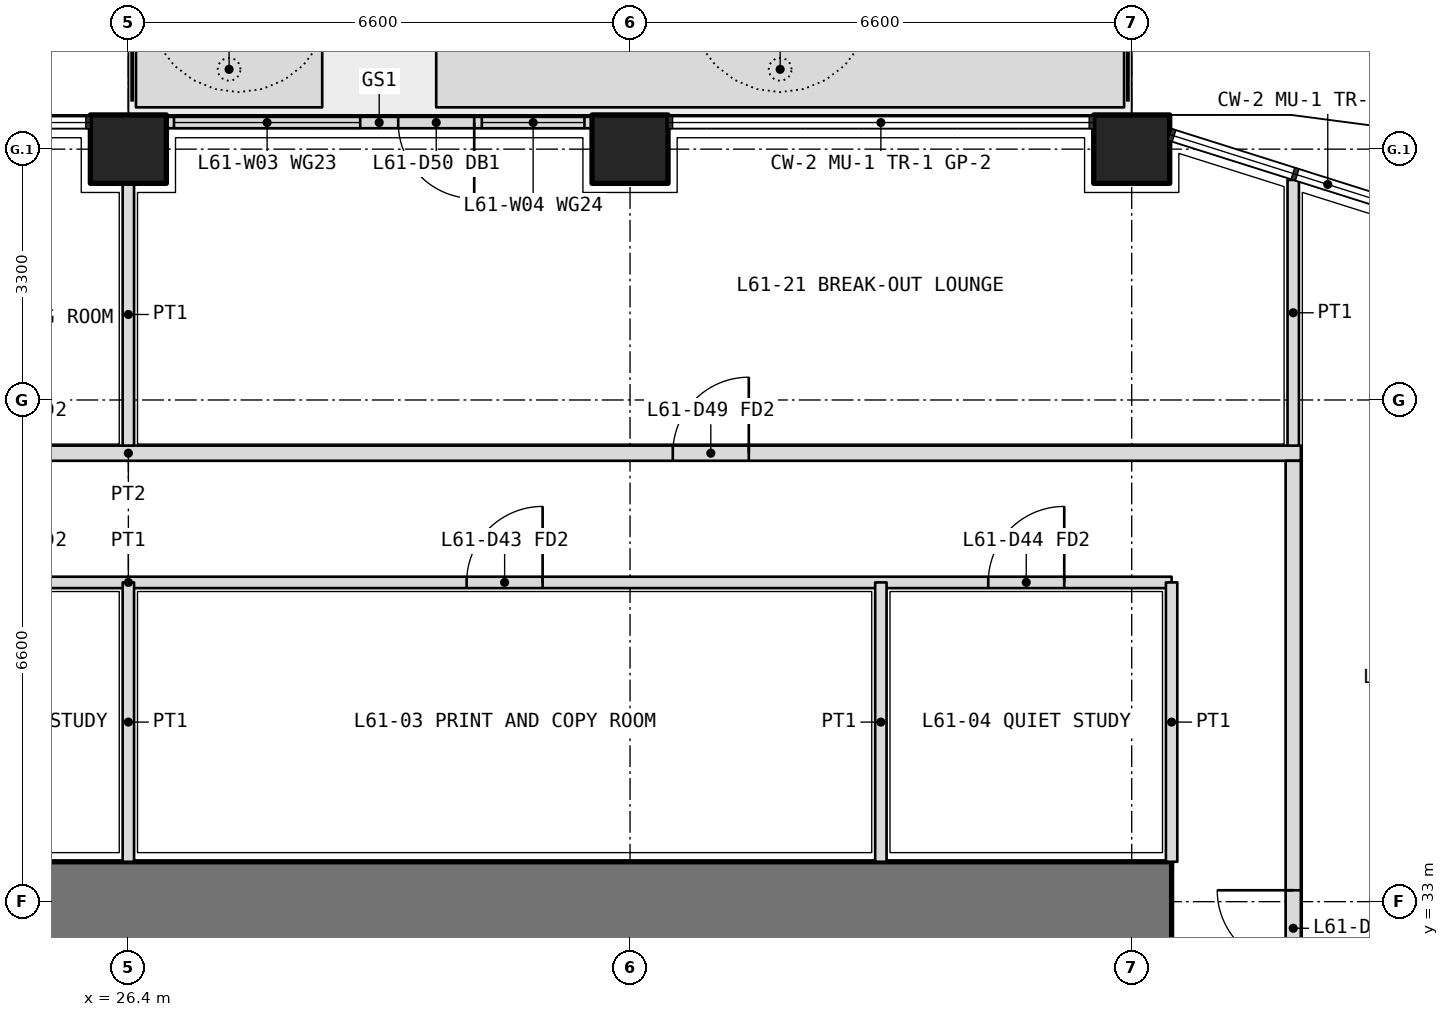
"""IFC4 building model, lengths in metres.
Left out: names, types, materials, properties, quantities, classifications, styles, units other than length and angle.
Written with IfcOpenShell. Run it as: python <this file> out.ifc"""

import sys

from ifc_helpers import new_model, si_unit, direction, frame, frame_2d, origin, origin_2d, place, context, subcontext, project, spatial, polyline, rectangle, outline, extrude, element, fill, save


model = new_model("IFC4")
c1 = context("Model", 3, precision=1e-05, world=origin(), true_north=direction((0.0, 1.0)))
c2 = subcontext(c1, "Body", "Model", "MODEL_VIEW")
j1 = project(units=[si_unit("LENGTHUNIT", "METRE"), si_unit("PLANEANGLEUNIT", "RADIAN")], contexts=[c1])
p1 = place(None, origin())
s1 = spatial("IfcSite", under=j1, at=p1, CompositionType="ELEMENT")
p2 = place(p1, origin())
s2 = spatial("IfcBuilding", under=s1, at=p2, CompositionType="ELEMENT")
p3 = place(p2, frame((0.0, 0.0, 267.0)))
s3 = spatial("IfcBuildingStorey", under=s2, at=p3, CompositionType="ELEMENT", Elevation=267.0)
for number, where, z_axis, x_axis in (
    (1, (26.4, 42.9, 0.0), (0.0, 0.0, 1.0), (1.0, 0.0, 0.0)),
    (2, (33.0, 42.9, 0.0), (0.0, 0.0, 1.0), (1.0, 0.0, 0.0)),
    (3, (39.6, 42.9, 0.0), (0.0, 0.0, 1.0), (1.0, 0.0, 0.0)),
):
    element("IfcColumn", number, at=place(p3, frame(where, z_axis=z_axis, x_axis=x_axis)), inside=s3, PredefinedType="COLUMN", context=c2, shape_type="SweptSolid", body=[
        extrude(rectangle(XDim=1.0, YDim=0.9, at=origin_2d()), origin(), (0.0, 0.0, 1.0), 4.2),
    ])
p4 = place(p3, origin())
e4 = element("IfcWall", 4, at=p4, inside=s3, PredefinedType="USERDEFINED", context=c2, shape_type="SweptSolid", body=[
    extrude(outline(polyline([(26.5, 43.45), (28.95, 43.45), (28.95, 44.45), (26.5, 44.45), (26.5, 43.45)]), holes=[polyline([(26.65, 43.6), (28.8, 43.6), (28.8, 44.3), (26.65, 44.3), (26.65, 43.6)])]), origin(), (0.0, 0.0, 1.0), 1.05),
])
p5 = place(p3, origin())
e5 = element("IfcWall", 5, at=p5, inside=s3, PredefinedType="USERDEFINED", context=c2, shape_type="SweptSolid", body=[
    extrude(outline(polyline([(30.45, 43.45), (39.5, 43.45), (39.5, 44.45), (30.45, 44.45), (30.45, 43.45)]), holes=[polyline([(30.6, 43.6), (39.35, 43.6), (39.35, 44.3), (30.6, 44.3), (30.6, 43.6)])]), origin(), (0.0, 0.0, 1.0), 1.05),
])
p6 = place(p3, frame((32.5, 43.25, 0.0), z_axis=(0.0, 0.0, 1.0), x_axis=(-1.0, 0.0, 0.0)))
e6 = element("IfcWall", 6, at=p6, inside=s3, PredefinedType="SOLIDWALL", context=c2, shape_type="SweptSolid", body=[
    extrude(rectangle(XDim=5.6, YDim=0.15, at=frame_2d((2.8, 0.0))), origin(), (0.0, 0.0, 1.0), 2.7),
])
p7 = place(p6, frame((1.55, 0.0, 0.0)))
e7 = element("IfcOpeningElement", 7, at=p7, cuts=e6, PredefinedType="OPENING", context=c2, shape_type="SweptSolid", body=[
    extrude(rectangle(XDim=1.0, YDim=2.4, at=frame_2d((0.5, 1.2))), frame((0.0, 0.085, 0.0), z_axis=(0.0, -1.0, 0.0), x_axis=(1.0, 0.0, 0.0)), (0.0, 0.0, 1.0), 0.17),
])
p8 = place(p6, frame((0.1, 0.0, 0.1)))
e8 = element("IfcOpeningElement", 8, at=p8, cuts=e6, PredefinedType="OPENING", context=c2, shape_type="SweptSolid", body=[
    extrude(rectangle(XDim=1.35, YDim=2.3, at=frame_2d((0.675, 1.15))), frame((0.0, 0.085, 0.0), z_axis=(0.0, -1.0, 0.0), x_axis=(1.0, 0.0, 0.0)), (0.0, 0.0, 1.0), 0.17),
])
p9 = place(p6, frame((3.05, 0.0, 0.1)))
e9 = element("IfcOpeningElement", 9, at=p9, cuts=e6, PredefinedType="OPENING", context=c2, shape_type="SweptSolid", body=[
    extrude(rectangle(XDim=2.45, YDim=2.3, at=frame_2d((1.225, 1.15))), frame((0.0, 0.085, 0.0), z_axis=(0.0, -1.0, 0.0), x_axis=(1.0, 0.0, 0.0)), (0.0, 0.0, 1.0), 0.17),
])
p10 = place(p3, frame((40.125, 33.0, 0.0), z_axis=(0.0, 0.0, 1.0), x_axis=(-1.0, 0.0, 0.0)))
e10 = element("IfcWall", 10, at=p10, inside=s3, PredefinedType="SHEAR", context=c2, shape_type="SweptSolid", body=[
    extrude(rectangle(XDim=27.45, YDim=1.05, at=frame_2d((13.725, 0.0))), origin(), (0.0, 0.0, 1.0), 4.2),
])
p11 = place(p3, frame((12.675, 37.2, 0.0), z_axis=(0.0, 0.0, 1.0), x_axis=(1.0, 0.0, 0.0)))
e11 = element("IfcWall", 11, at=p11, inside=s3, PredefinedType="PARTITIONING", context=c2, shape_type="SweptSolid", body=[
    extrude(rectangle(XDim=27.45, YDim=0.15, at=frame_2d((13.725, 0.0))), origin(), (0.0, 0.0, 1.0), 3.0),
])
p12 = place(p11, frame((4.712, 0.0, 0.0)))
e12 = element("IfcOpeningElement", 12, at=p12, cuts=e11, PredefinedType="OPENING", context=c2, shape_type="SweptSolid", body=[
    extrude(rectangle(XDim=1.0, YDim=2.1, at=frame_2d((0.5, 1.05))), frame((0.0, 0.085, 0.0), z_axis=(0.0, -1.0, 0.0), x_axis=(1.0, 0.0, 0.0)), (0.0, 0.0, 1.0), 0.17),
])
p13 = place(p11, frame((11.575, 0.0, 0.0)))
e13 = element("IfcOpeningElement", 13, at=p13, cuts=e11, PredefinedType="OPENING", context=c2, shape_type="SweptSolid", body=[
    extrude(rectangle(XDim=1.0, YDim=2.1, at=frame_2d((0.5, 1.05))), frame((0.0, 0.085, 0.0), z_axis=(0.0, -1.0, 0.0), x_axis=(1.0, 0.0, 0.0)), (0.0, 0.0, 1.0), 0.17),
])
p14 = place(p11, frame((18.175, 0.0, 0.0)))
e14 = element("IfcOpeningElement", 14, at=p14, cuts=e11, PredefinedType="OPENING", context=c2, shape_type="SweptSolid", body=[
    extrude(rectangle(XDim=1.0, YDim=2.1, at=frame_2d((0.5, 1.05))), frame((0.0, 0.085, 0.0), z_axis=(0.0, -1.0, 0.0), x_axis=(1.0, 0.0, 0.0)), (0.0, 0.0, 1.0), 0.17),
])
p15 = place(p11, frame((25.038, 0.0, 0.0)))
e15 = element("IfcOpeningElement", 15, at=p15, cuts=e11, PredefinedType="OPENING", context=c2, shape_type="SweptSolid", body=[
    extrude(rectangle(XDim=1.0, YDim=2.1, at=frame_2d((0.5, 1.05))), frame((0.0, 0.085, 0.0), z_axis=(0.0, -1.0, 0.0), x_axis=(1.0, 0.0, 0.0)), (0.0, 0.0, 1.0), 0.17),
])
for number, where, z_axis, x_axis in (
    (16, (40.125, 33.525, 0.0), (0.0, 0.0, 1.0), (0.0, 1.0, 0.0)),
    (17, (26.4, 33.525, 0.0), (0.0, 0.0, 1.0), (0.0, 1.0, 0.0)),
):
    element("IfcWall", number, at=place(p3, frame(where, z_axis=z_axis, x_axis=x_axis)), inside=s3, PredefinedType="PARTITIONING", context=c2, shape_type="SweptSolid", body=[
        extrude(rectangle(XDim=3.675, YDim=0.15, at=frame_2d((1.837, 0.0))), origin(), (0.0, 0.0, 1.0), 3.0),
    ])
p16 = place(p3, frame((36.3, 33.525, 0.0), z_axis=(0.0, 0.0, 1.0), x_axis=(0.0, 1.0, 0.0)))
e18 = element("IfcWall", 18, at=p16, inside=s3, PredefinedType="PARTITIONING", context=c2, shape_type="SweptSolid", body=[
    extrude(rectangle(XDim=3.675, YDim=0.15, at=frame_2d((1.837, 0.0))), origin(), (0.0, 0.0, 1.0), 3.9),
])
p17 = place(p3, frame((10.975, 38.9, 0.0), z_axis=(0.0, 0.0, 1.0), x_axis=(1.0, 0.0, 0.0)))
e19 = element("IfcWall", 19, at=p17, inside=s3, PredefinedType="PARTITIONING", context=c2, shape_type="SweptSolid", body=[
    extrude(rectangle(XDim=30.85, YDim=0.2, at=frame_2d((15.425, 0.0))), origin(), (0.0, 0.0, 1.0), 3.0),
])
p18 = place(p17, frame((0.663, 0.0, 0.0)))
e20 = element("IfcOpeningElement", 20, at=p18, cuts=e19, PredefinedType="OPENING", context=c2, shape_type="SweptSolid", body=[
    extrude(rectangle(XDim=1.0, YDim=2.1, at=frame_2d((0.5, 1.05))), frame((0.0, 0.11, 0.0), z_axis=(0.0, -1.0, 0.0), x_axis=(1.0, 0.0, 0.0)), (0.0, 0.0, 1.0), 0.22),
])
p19 = place(p17, frame((3.375, 0.0, 0.0)))
e21 = element("IfcOpeningElement", 21, at=p19, cuts=e19, PredefinedType="OPENING", context=c2, shape_type="SweptSolid", body=[
    extrude(rectangle(XDim=1.0, YDim=2.1, at=frame_2d((0.5, 1.05))), frame((0.0, 0.11, 0.0), z_axis=(0.0, -1.0, 0.0), x_axis=(1.0, 0.0, 0.0)), (0.0, 0.0, 1.0), 0.22),
])
p20 = place(p17, frame((8.325, 0.0, 0.0)))
e22 = element("IfcOpeningElement", 22, at=p20, cuts=e19, PredefinedType="OPENING", context=c2, shape_type="SweptSolid", body=[
    extrude(rectangle(XDim=1.0, YDim=2.1, at=frame_2d((0.5, 1.05))), frame((0.0, 0.11, 0.0), z_axis=(0.0, -1.0, 0.0), x_axis=(1.0, 0.0, 0.0)), (0.0, 0.0, 1.0), 0.22),
])
p21 = place(p17, frame((13.275, 0.0, 0.0)))
e23 = element("IfcOpeningElement", 23, at=p21, cuts=e19, PredefinedType="OPENING", context=c2, shape_type="SweptSolid", body=[
    extrude(rectangle(XDim=1.0, YDim=2.1, at=frame_2d((0.5, 1.05))), frame((0.0, 0.11, 0.0), z_axis=(0.0, -1.0, 0.0), x_axis=(1.0, 0.0, 0.0)), (0.0, 0.0, 1.0), 0.22),
])
p22 = place(p17, frame((22.587, 0.0, 0.0)))
e24 = element("IfcOpeningElement", 24, at=p22, cuts=e19, PredefinedType="OPENING", context=c2, shape_type="SweptSolid", body=[
    extrude(rectangle(XDim=1.0, YDim=2.1, at=frame_2d((0.5, 1.05))), frame((0.0, 0.11, 0.0), z_axis=(0.0, -1.0, 0.0), x_axis=(1.0, 0.0, 0.0)), (0.0, 0.0, 1.0), 0.22),
])
p23 = place(p3, frame((41.725, 19.8, 0.0), z_axis=(0.0, 0.0, 1.0), x_axis=(0.0, 1.0, 0.0)))
e25 = element("IfcWall", 25, at=p23, inside=s3, PredefinedType="PARTITIONING", context=c2, shape_type="SweptSolid", body=[
    extrude(rectangle(XDim=19.0, YDim=0.2, at=frame_2d((9.5, 0.0))), origin(), (0.0, 0.0, 1.0), 3.0),
])
p24 = place(p23, frame((1.0, 0.0, 0.0)))
e26 = element("IfcOpeningElement", 26, at=p24, cuts=e25, PredefinedType="OPENING", context=c2, shape_type="SweptSolid", body=[
    extrude(rectangle(XDim=1.0, YDim=2.1, at=frame_2d((0.5, 1.05))), frame((0.0, 0.11, 0.0), z_axis=(0.0, -1.0, 0.0), x_axis=(1.0, 0.0, 0.0)), (0.0, 0.0, 1.0), 0.22),
])
p25 = place(p23, frame((4.35, 0.0, 0.0)))
e27 = element("IfcOpeningElement", 27, at=p25, cuts=e25, PredefinedType="OPENING", context=c2, shape_type="SweptSolid", body=[
    extrude(rectangle(XDim=0.9, YDim=2.1, at=frame_2d((0.45, 1.05))), frame((0.0, 0.11, 0.0), z_axis=(0.0, -1.0, 0.0), x_axis=(1.0, 0.0, 0.0)), (0.0, 0.0, 1.0), 0.22),
])
p26 = place(p23, frame((12.35, 0.0, 0.0)))
e28 = element("IfcOpeningElement", 28, at=p26, cuts=e25, PredefinedType="OPENING", context=c2, shape_type="SweptSolid", body=[
    extrude(rectangle(XDim=1.0, YDim=2.1, at=frame_2d((0.5, 1.05))), frame((0.0, 0.11, 0.0), z_axis=(0.0, -1.0, 0.0), x_axis=(1.0, 0.0, 0.0)), (0.0, 0.0, 1.0), 0.22),
])
p27 = place(p3, frame((41.725, 42.495, 0.0), z_axis=(0.0, 0.0, 1.0), x_axis=(0.0, -1.0, 0.0)))
e29 = element("IfcWall", 29, at=p27, inside=s3, PredefinedType="PARTITIONING", context=c2, shape_type="SweptSolid", body=[
    extrude(rectangle(XDim=3.495, YDim=0.15, at=frame_2d((1.748, 0.0))), origin(), (0.0, 0.0, 1.0), 2.7),
])
p28 = place(p3, frame((26.4, 42.45, 0.0), z_axis=(0.0, 0.0, 1.0), x_axis=(0.0, -1.0, 0.0)))
e30 = element("IfcWall", 30, at=p28, inside=s3, PredefinedType="PARTITIONING", context=c2, shape_type="SweptSolid", body=[
    extrude(rectangle(XDim=3.45, YDim=0.15, at=frame_2d((1.725, 0.0))), origin(), (0.0, 0.0, 1.0), 3.0),
])
p29 = place(p7, origin())
e31 = element("IfcDoor", 31, at=p29, inside=s3, OperationType="SINGLE_SWING_LEFT", PredefinedType="DOOR", context=c2, shape_type="SweptSolid", body=[
    extrude(rectangle(XDim=1.0, YDim=2.4, at=frame_2d((0.5, 1.2))), frame((0.0, 0.025, 0.0), z_axis=(0.0, -1.0, 0.0), x_axis=(1.0, 0.0, 0.0)), (0.0, 0.0, 1.0), 0.05),
])
fill(e7, e31)
p30 = place(p8, origin())
e32 = element("IfcWindow", 32, at=p30, inside=s3, PartitioningType="SINGLE_PANEL", PredefinedType="WINDOW", context=c2, shape_type="SweptSolid", body=[
    extrude(rectangle(XDim=1.35, YDim=2.3, at=frame_2d((0.675, 1.15))), frame((0.0, 0.03, 0.0), z_axis=(0.0, -1.0, 0.0), x_axis=(1.0, 0.0, 0.0)), (0.0, 0.0, 1.0), 0.06),
])
fill(e8, e32)
p31 = place(p9, origin())
e33 = element("IfcWindow", 33, at=p31, inside=s3, PartitioningType="SINGLE_PANEL", PredefinedType="WINDOW", context=c2, shape_type="SweptSolid", body=[
    extrude(rectangle(XDim=2.45, YDim=2.3, at=frame_2d((1.225, 1.15))), frame((0.0, 0.03, 0.0), z_axis=(0.0, -1.0, 0.0), x_axis=(1.0, 0.0, 0.0)), (0.0, 0.0, 1.0), 0.06),
])
fill(e9, e33)
p32 = place(p14, origin())
e34 = element("IfcDoor", 34, at=p32, inside=s3, OperationType="SINGLE_SWING_RIGHT", PredefinedType="DOOR", context=c2, shape_type="SweptSolid", body=[
    extrude(rectangle(XDim=1.0, YDim=2.1, at=frame_2d((0.5, 1.05))), frame((0.0, 0.025, 0.0), z_axis=(0.0, -1.0, 0.0), x_axis=(1.0, 0.0, 0.0)), (0.0, 0.0, 1.0), 0.05),
])
fill(e14, e34)
p33 = place(p15, origin())
e35 = element("IfcDoor", 35, at=p33, inside=s3, OperationType="SINGLE_SWING_RIGHT", PredefinedType="DOOR", context=c2, shape_type="SweptSolid", body=[
    extrude(rectangle(XDim=1.0, YDim=2.1, at=frame_2d((0.5, 1.05))), frame((0.0, 0.025, 0.0), z_axis=(0.0, -1.0, 0.0), x_axis=(1.0, 0.0, 0.0)), (0.0, 0.0, 1.0), 0.05),
])
fill(e15, e35)
p34 = place(p26, origin())
e36 = element("IfcDoor", 36, at=p34, inside=s3, OperationType="SINGLE_SWING_RIGHT", PredefinedType="DOOR", context=c2, shape_type="SweptSolid", body=[
    extrude(rectangle(XDim=1.0, YDim=2.1, at=frame_2d((0.5, 1.05))), frame((0.0, 0.025, 0.0), z_axis=(0.0, -1.0, 0.0), x_axis=(1.0, 0.0, 0.0)), (0.0, 0.0, 1.0), 0.05),
])
fill(e28, e36)
p35 = place(p22, origin())
e37 = element("IfcDoor", 37, at=p35, inside=s3, OperationType="SINGLE_SWING_RIGHT", PredefinedType="DOOR", context=c2, shape_type="SweptSolid", body=[
    extrude(rectangle(XDim=1.0, YDim=2.1, at=frame_2d((0.5, 1.05))), frame((0.0, 0.025, 0.0), z_axis=(0.0, -1.0, 0.0), x_axis=(1.0, 0.0, 0.0)), (0.0, 0.0, 1.0), 0.05),
])
fill(e24, e37)
save(model, sys.argv[1])
